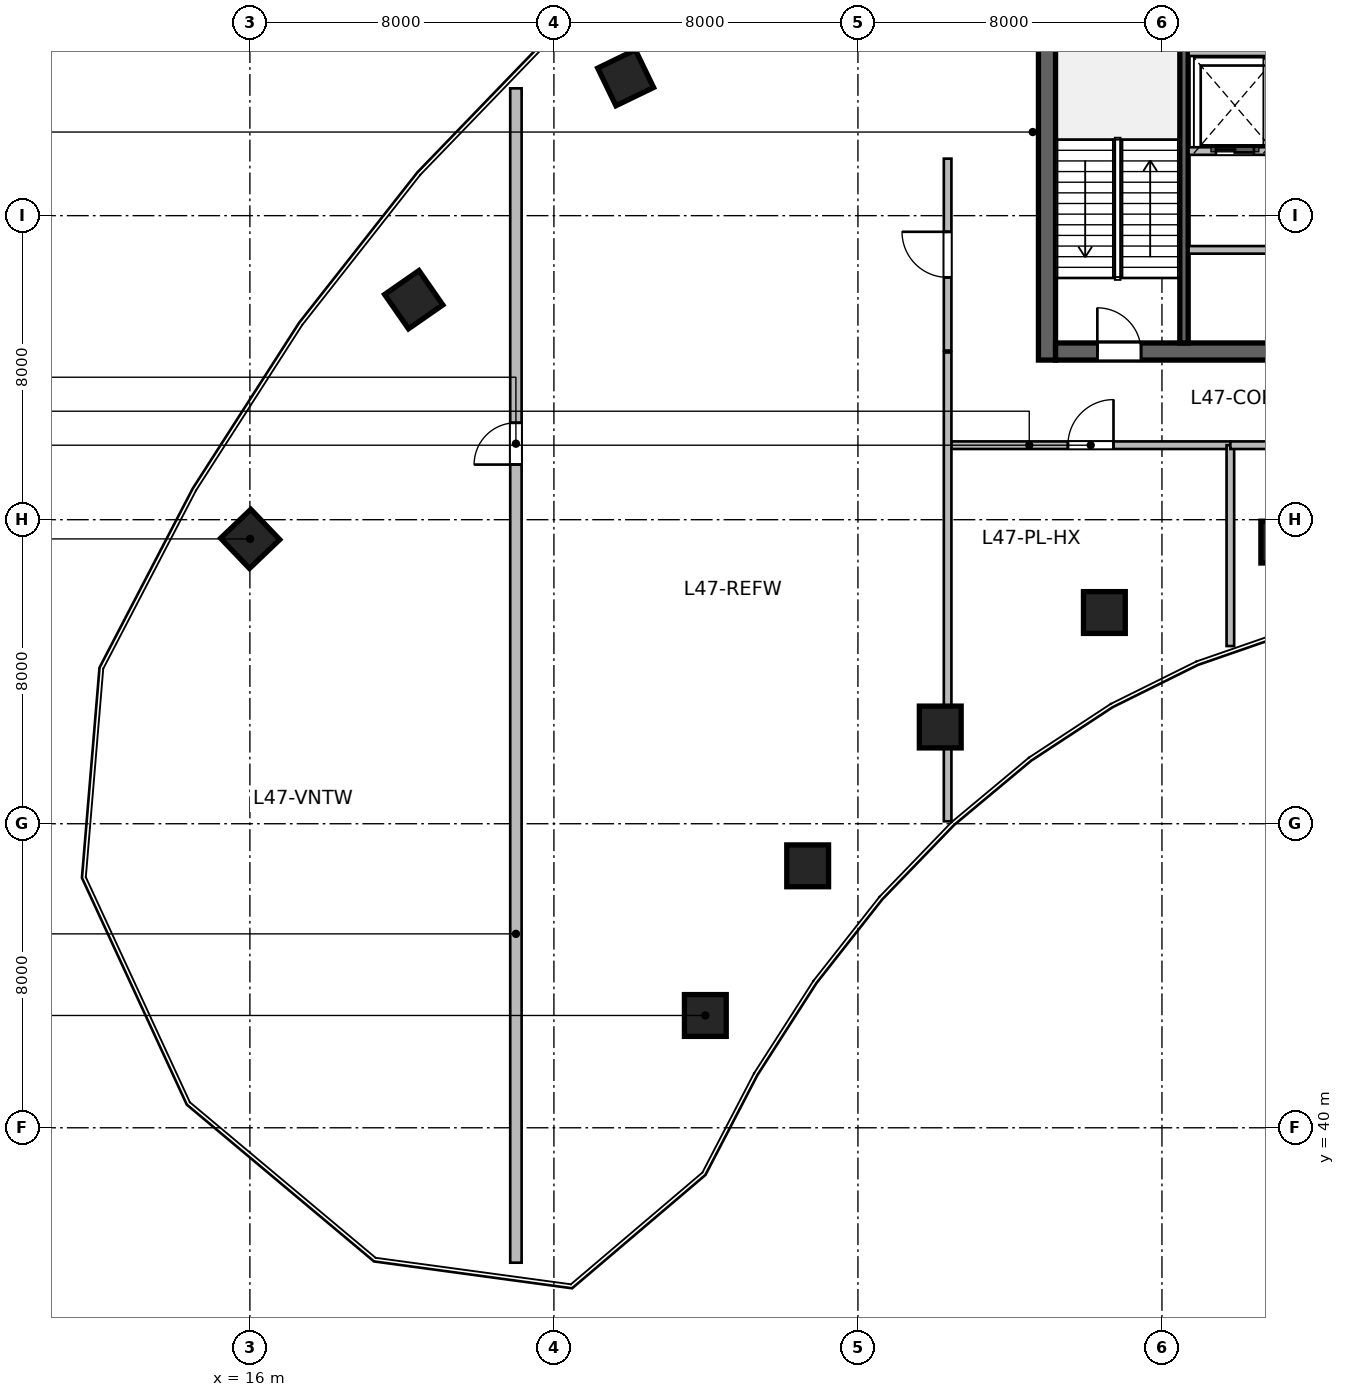
"""IFC4 building model, lengths in metres.
Left out: names, types, materials, properties, quantities, classifications, styles, units other than length and angle.
Written with IfcOpenShell. Run it as: python <this file> out.ifc"""

import sys

from ifc_helpers import new_model, si_unit, direction, frame, frame_2d, origin, origin_2d, place, context, subcontext, project, spatial, rectangle, circle, extrude, source, transform, mapped, element, fill, save


model = new_model("IFC4")
c1 = context("Model", 3, precision=1e-05, world=origin(), true_north=direction((0.0, 1.0)))
c2 = subcontext(c1, "Body", "Model", "MODEL_VIEW")
j1 = project(units=[si_unit("LENGTHUNIT", "METRE"), si_unit("PLANEANGLEUNIT", "RADIAN")], contexts=[c1])
p1 = place(None, origin())
s1 = spatial("IfcSite", under=j1, at=p1, CompositionType="ELEMENT")
p2 = place(p1, origin())
s2 = spatial("IfcBuilding", under=s1, at=p2, CompositionType="ELEMENT")
p3 = place(p2, frame((0.0, 0.0, 194.4)))
s3 = spatial("IfcBuildingStorey", under=s2, at=p3, CompositionType="ELEMENT", Elevation=194.4)
m1 = source(origin(), c2, "Body", "SweptSolid", [
    extrude(rectangle(XDim=12.0, YDim=0.45, at=frame_2d((6.0, 0.0))), origin(), (0.0, 0.0, 1.0), 4.8),
])
p4 = place(p3, frame((36.975, 60.2, 0.0), z_axis=(0.0, 0.0, 1.0), x_axis=(0.0, 1.0, 0.0)))
e1 = element("IfcWall", 1, at=p4, inside=s3, PredefinedType="SHEAR", context=c2, shape_type="MappedRepresentation", body=[
    mapped(m1, transform((0.0, 0.0, 0.0), scale=1.0)),
])
m2 = source(origin(), c2, "Body", "SweptSolid", [
    extrude(rectangle(XDim=21.6, YDim=0.45, at=frame_2d((10.8, 0.0))), origin(), (0.0, 0.0, 1.0), 4.8),
])
p5 = place(p3, frame((37.2, 60.425, 0.0), z_axis=(0.0, 0.0, 1.0), x_axis=(1.0, 0.0, 0.0)))
e2 = element("IfcWall", 2, at=p5, inside=s3, PredefinedType="SHEAR", context=c2, shape_type="MappedRepresentation", body=[
    mapped(m2, transform((0.0, 0.0, 0.0), scale=1.0)),
])
p6 = place(p5, frame((1.1, 0.0, 0.0)))
e3 = element("IfcOpeningElement", 3, at=p6, cuts=e2, PredefinedType="OPENING", context=c2, shape_type="SweptSolid", body=[
    extrude(rectangle(XDim=1.15, YDim=2.15, at=frame_2d((0.575, 1.075))), frame((0.0, 0.235, 0.0), z_axis=(0.0, -1.0, 0.0), x_axis=(1.0, 0.0, 0.0)), (0.0, 0.0, 1.0), 0.47),
])
p7 = place(p5, frame((19.5, 0.0, 0.0)))
e4 = element("IfcOpeningElement", 4, at=p7, cuts=e2, PredefinedType="OPENING", context=c2, shape_type="SweptSolid", body=[
    extrude(rectangle(XDim=0.9, YDim=2.1, at=frame_2d((0.45, 1.05))), frame((0.0, 0.235, 0.0), z_axis=(0.0, -1.0, 0.0), x_axis=(1.0, 0.0, 0.0)), (0.0, 0.0, 1.0), 0.47),
])
p8 = place(p5, frame((12.02, 0.0, 0.0)))
e5 = element("IfcOpeningElement", 5, at=p8, cuts=e2, PredefinedType="OPENING", context=c2, shape_type="SweptSolid", body=[
    extrude(rectangle(XDim=1.6, YDim=2.15, at=frame_2d((0.8, 1.075))), frame((0.0, 0.235, 0.0), z_axis=(0.0, -1.0, 0.0), x_axis=(1.0, 0.0, 0.0)), (0.0, 0.0, 1.0), 0.47),
])
m3 = source(origin(), c2, "Body", "SweptSolid", [
    extrude(rectangle(XDim=11.1, YDim=0.22, at=frame_2d((5.55, 0.0))), origin(), (0.0, 0.0, 1.0), 4.8),
])
p9 = place(p3, frame((40.58, 60.65, 0.0), z_axis=(0.0, 0.0, 1.0), x_axis=(0.0, 1.0, 0.0)))
e6 = element("IfcWall", 6, at=p9, inside=s3, PredefinedType="SHEAR", context=c2, shape_type="MappedRepresentation", body=[
    mapped(m3, transform((0.0, 0.0, 0.0), scale=1.0)),
])
m4 = source(origin(), c2, "Body", "SweptSolid", [
    extrude(circle(Radius=0.55, at=origin_2d()), origin(), (0.0, 0.0, 1.0), 4.8),
])
p10 = place(p3, frame((27.985, 42.955, 0.0), z_axis=(0.0, 0.0, 1.0), x_axis=(-0.690756218984, 0.723087716626, 0.0)))
e7 = element("IfcColumn", 7, at=p10, inside=s3, PredefinedType="COLUMN", context=c2, shape_type="MappedRepresentation", body=[
    mapped(m4, transform((0.0, 0.0, 0.0), scale=1.0)),
])
m5 = source(origin(), c2, "Body", "SweptSolid", [
    extrude(rectangle(XDim=1.1, YDim=1.1, at=origin_2d()), origin(), (0.0, 0.0, 1.0), 4.8),
])
p11 = place(p3, frame((16.007, 55.494, 0.0), z_axis=(0.0, 0.0, 1.0), x_axis=(-0.690756218984, 0.723087716626, 0.0)))
e8 = element("IfcColumn", 8, at=p11, inside=s3, PredefinedType="COLUMN", context=c2, shape_type="MappedRepresentation", body=[
    mapped(m5, transform((0.0, 0.0, 0.0), scale=1.0)),
])
p12 = place(p3, frame((30.677, 46.892, 0.0), z_axis=(0.0, 0.0, 1.0), x_axis=(-0.571143442153, 0.820850271661, 0.0)))
e9 = element("IfcColumn", 9, at=p12, inside=s3, PredefinedType="COLUMN", context=c2, shape_type="MappedRepresentation", body=[
    mapped(m4, transform((0.0, 0.0, 0.0), scale=1.0)),
])
p13 = place(p3, frame((20.311, 61.789, 0.0), z_axis=(0.0, 0.0, 1.0), x_axis=(-0.571143442153, 0.820850271661, 0.0)))
e10 = element("IfcColumn", 10, at=p13, inside=s3, PredefinedType="COLUMN", context=c2, shape_type="MappedRepresentation", body=[
    mapped(m5, transform((0.0, 0.0, 0.0), scale=1.0)),
])
p14 = place(p3, frame((34.166, 50.545, 0.0), z_axis=(0.0, 0.0, 1.0), x_axis=(-0.436173672171, 0.899862504889, 0.0)))
e11 = element("IfcColumn", 11, at=p14, inside=s3, PredefinedType="COLUMN", context=c2, shape_type="MappedRepresentation", body=[
    mapped(m4, transform((0.0, 0.0, 0.0), scale=1.0)),
])
p15 = place(p3, frame((25.888, 67.627, 0.0), z_axis=(0.0, 0.0, 1.0), x_axis=(-0.436173672171, 0.899862504889, 0.0)))
e12 = element("IfcColumn", 12, at=p15, inside=s3, PredefinedType="COLUMN", context=c2, shape_type="MappedRepresentation", body=[
    mapped(m5, transform((0.0, 0.0, 0.0), scale=1.0)),
])
for number, where, z_axis, x_axis in (
    (13, (38.485, 53.558, 0.0), (0.0, 0.0, 1.0), (-0.289, 0.957, 0.0)),
    (14, (43.154, 55.411, 0.0), (0.0, 0.0, 1.0), (-0.143, 0.99, 0.0)),
):
    element("IfcColumn", number, at=place(p3, frame(where, z_axis=z_axis, x_axis=x_axis)), inside=s3, PredefinedType="COLUMN", context=c2, shape_type="MappedRepresentation", body=[
        mapped(m4, transform((0.0, 0.0, 0.0), scale=1.0)),
    ])
m6 = source(origin(), c2, "Body", "SweptSolid", [
    extrude(rectangle(XDim=30.9, YDim=0.3, at=frame_2d((15.45, 0.0))), origin(), (0.0, 0.0, 1.0), 4.54),
])
p16 = place(p3, frame((23.0, 36.45, 0.0), z_axis=(0.0, 0.0, 1.0), x_axis=(0.0, 1.0, 0.0)))
e15 = element("IfcWall", 15, at=p16, inside=s3, PredefinedType="SOLIDWALL", context=c2, shape_type="MappedRepresentation", body=[
    mapped(m6, transform((0.0, 0.0, 0.0), scale=1.0)),
])
p17 = place(p16, frame((21.0, 0.0, 0.0)))
e16 = element("IfcOpeningElement", 16, at=p17, cuts=e15, PredefinedType="OPENING", context=c2, shape_type="SweptSolid", body=[
    extrude(rectangle(XDim=1.1, YDim=2.15, at=frame_2d((0.55, 1.075))), frame((0.0, 0.16, 0.0), z_axis=(0.0, -1.0, 0.0), x_axis=(1.0, 0.0, 0.0)), (0.0, 0.0, 1.0), 0.32),
])
m7 = source(origin(), c2, "Body", "SweptSolid", [
    extrude(rectangle(XDim=8.8, YDim=0.2, at=frame_2d((4.4, 0.0))), origin(), (0.0, 0.0, 1.0), 4.54),
])
p18 = place(p3, frame((40.7, 68.3, 0.0), z_axis=(0.0, 0.0, 1.0), x_axis=(1.0, 0.0, 0.0)))
e17 = element("IfcWall", 17, at=p18, inside=s3, PredefinedType="SOLIDWALL", context=c2, shape_type="MappedRepresentation", body=[
    mapped(m7, transform((0.0, 0.0, 0.0), scale=1.0)),
])
m8 = source(origin(), c2, "Body", "SweptSolid", [
    extrude(rectangle(XDim=8.02, YDim=0.2, at=frame_2d((4.01, 0.0))), origin(), (0.0, 0.0, 1.0), 4.54),
])
p19 = place(p3, frame((40.7, 63.1, 0.0), z_axis=(0.0, 0.0, 1.0), x_axis=(1.0, 0.0, 0.0)))
e18 = element("IfcWall", 18, at=p19, inside=s3, PredefinedType="SOLIDWALL", context=c2, shape_type="MappedRepresentation", body=[
    mapped(m8, transform((0.0, 0.0, 0.0), scale=1.0)),
])
p20 = place(p3, frame((40.7, 65.7, 0.0), z_axis=(0.0, 0.0, 1.0), x_axis=(1.0, 0.0, 0.0)))
e19 = element("IfcWall", 19, at=p20, inside=s3, PredefinedType="SOLIDWALL", context=c2, shape_type="MappedRepresentation", body=[
    mapped(m7, transform((0.0, 0.0, 0.0), scale=1.0)),
])
p21 = place(p20, frame((0.72, 0.0, 0.0)))
e20 = element("IfcOpeningElement", 20, at=p21, cuts=e19, PredefinedType="OPENING", context=c2, shape_type="SweptSolid", body=[
    extrude(rectangle(XDim=1.0, YDim=2.15, at=frame_2d((0.5, 1.075))), frame((0.0, 0.11, 0.0), z_axis=(0.0, -1.0, 0.0), x_axis=(1.0, 0.0, 0.0)), (0.0, 0.0, 1.0), 0.22),
])
p22 = place(p20, frame((2.62, 0.0, 0.0)))
e21 = element("IfcOpeningElement", 21, at=p22, cuts=e19, PredefinedType="OPENING", context=c2, shape_type="SweptSolid", body=[
    extrude(rectangle(XDim=1.0, YDim=2.15, at=frame_2d((0.5, 1.075))), frame((0.0, 0.11, 0.0), z_axis=(0.0, -1.0, 0.0), x_axis=(1.0, 0.0, 0.0)), (0.0, 0.0, 1.0), 0.22),
])
p23 = place(p20, frame((4.55, 0.0, 0.0)))
e22 = element("IfcOpeningElement", 22, at=p23, cuts=e19, PredefinedType="OPENING", context=c2, shape_type="SweptSolid", body=[
    extrude(rectangle(XDim=1.0, YDim=2.15, at=frame_2d((0.5, 1.075))), frame((0.0, 0.11, 0.0), z_axis=(0.0, -1.0, 0.0), x_axis=(1.0, 0.0, 0.0)), (0.0, 0.0, 1.0), 0.22),
])
p24 = place(p20, frame((6.55, 0.0, 0.0)))
e23 = element("IfcOpeningElement", 23, at=p24, cuts=e19, PredefinedType="OPENING", context=c2, shape_type="SweptSolid", body=[
    extrude(rectangle(XDim=1.0, YDim=2.15, at=frame_2d((0.5, 1.075))), frame((0.0, 0.11, 0.0), z_axis=(0.0, -1.0, 0.0), x_axis=(1.0, 0.0, 0.0)), (0.0, 0.0, 1.0), 0.22),
])
m9 = source(origin(), c2, "Body", "SweptSolid", [
    extrude(rectangle(XDim=7.35, YDim=0.2, at=frame_2d((3.675, 0.0))), origin(), (0.0, 0.0, 1.0), 3.985),
])
p25 = place(p3, frame((34.45, 57.96, 0.0), z_axis=(0.0, 0.0, 1.0), x_axis=(1.0, 0.0, 0.0)))
e24 = element("IfcWall", 24, at=p25, inside=s3, PredefinedType="SOLIDWALL", context=c2, shape_type="MappedRepresentation", body=[
    mapped(m9, transform((0.0, 0.0, 0.0), scale=1.0)),
])
p26 = place(p25, frame((3.075, 0.0, 0.0)))
e25 = element("IfcOpeningElement", 25, at=p26, cuts=e24, PredefinedType="OPENING", context=c2, shape_type="SweptSolid", body=[
    extrude(rectangle(XDim=1.2, YDim=2.15, at=frame_2d((0.6, 1.075))), frame((0.0, 0.11, 0.0), z_axis=(0.0, -1.0, 0.0), x_axis=(1.0, 0.0, 0.0)), (0.0, 0.0, 1.0), 0.22),
])
m10 = source(origin(), c2, "Body", "SweptSolid", [
    extrude(rectangle(XDim=5.285, YDim=0.2, at=frame_2d((2.643, 0.0))), origin(), (0.0, 0.0, 1.0), 4.54),
])
p27 = place(p3, frame((41.8, 52.675, 0.0), z_axis=(0.0, 0.0, 1.0), x_axis=(0.0, 1.0, 0.0)))
e26 = element("IfcWall", 26, at=p27, inside=s3, PredefinedType="SOLIDWALL", context=c2, shape_type="MappedRepresentation", body=[
    mapped(m10, transform((0.0, 0.0, 0.0), scale=1.0)),
])
m11 = source(origin(), c2, "Body", "SweptSolid", [
    extrude(rectangle(XDim=7.0, YDim=0.2, at=frame_2d((3.5, 0.0))), origin(), (0.0, 0.0, 1.0), 4.54),
])
p28 = place(p3, frame((41.8, 57.96, 0.0), z_axis=(0.0, 0.0, 1.0), x_axis=(1.0, 0.0, 0.0)))
e27 = element("IfcWall", 27, at=p28, inside=s3, PredefinedType="SOLIDWALL", context=c2, shape_type="MappedRepresentation", body=[
    mapped(m11, transform((0.0, 0.0, 0.0), scale=1.0)),
])
p29 = place(p28, frame((2.9, 0.0, 0.0)))
e28 = element("IfcOpeningElement", 28, at=p29, cuts=e27, PredefinedType="OPENING", context=c2, shape_type="SweptSolid", body=[
    extrude(rectangle(XDim=1.2, YDim=2.15, at=frame_2d((0.6, 1.075))), frame((0.0, 0.11, 0.0), z_axis=(0.0, -1.0, 0.0), x_axis=(1.0, 0.0, 0.0)), (0.0, 0.0, 1.0), 0.22),
])
m12 = source(origin(), c2, "Body", "SweptSolid", [
    extrude(rectangle(XDim=12.336, YDim=0.2, at=frame_2d((6.168, 0.0))), origin(), (0.0, 0.0, 1.0), 4.54),
])
p30 = place(p3, frame((34.36, 48.064, 0.0), z_axis=(0.0, 0.0, 1.0), x_axis=(0.0, 1.0, 0.0)))
e29 = element("IfcWall", 29, at=p30, inside=s3, PredefinedType="SOLIDWALL", context=c2, shape_type="MappedRepresentation", body=[
    mapped(m12, transform((0.0, 0.0, 0.0), scale=1.0)),
])
m13 = source(origin(), c2, "Body", "SweptSolid", [
    extrude(rectangle(XDim=5.05, YDim=0.2, at=frame_2d((2.525, 0.0))), origin(), (0.0, 0.0, 1.0), 4.54),
])
p31 = place(p3, frame((34.36, 60.45, 0.0), z_axis=(0.0, 0.0, 1.0), x_axis=(0.0, 1.0, 0.0)))
e30 = element("IfcWall", 30, at=p31, inside=s3, PredefinedType="SOLIDWALL", context=c2, shape_type="MappedRepresentation", body=[
    mapped(m13, transform((0.0, 0.0, 0.0), scale=1.0)),
])
p32 = place(p31, frame((1.925, 0.0, 0.0)))
e31 = element("IfcOpeningElement", 31, at=p32, cuts=e30, PredefinedType="OPENING", context=c2, shape_type="SweptSolid", body=[
    extrude(rectangle(XDim=1.2, YDim=2.15, at=frame_2d((0.6, 1.075))), frame((0.0, 0.11, 0.0), z_axis=(0.0, -1.0, 0.0), x_axis=(1.0, 0.0, 0.0)), (0.0, 0.0, 1.0), 0.22),
])
m14 = source(origin(), c2, "Body", "SweptSolid", [
    extrude(rectangle(XDim=1.1, YDim=2.15, at=frame_2d((0.55, 1.075))), frame((0.0, 0.025, 0.0), z_axis=(0.0, -1.0, 0.0), x_axis=(1.0, 0.0, 0.0)), (0.0, 0.0, 1.0), 0.05),
])
p33 = place(p17, origin())
e32 = element("IfcDoor", 32, at=p33, inside=s3, OperationType="SINGLE_SWING_LEFT", PredefinedType="DOOR", context=c2, shape_type="MappedRepresentation", body=[
    mapped(m14, transform((0.0, 0.0, 0.0), scale=1.0)),
])
fill(e16, e32)
m15 = source(origin(), c2, "Body", "SweptSolid", [
    extrude(rectangle(XDim=1.15, YDim=2.15, at=frame_2d((0.575, 1.075))), frame((0.0, 0.025, 0.0), z_axis=(0.0, -1.0, 0.0), x_axis=(1.0, 0.0, 0.0)), (0.0, 0.0, 1.0), 0.05),
])
p34 = place(p6, origin())
e33 = element("IfcDoor", 33, at=p34, inside=s3, OperationType="SINGLE_SWING_LEFT", PredefinedType="DOOR", context=c2, shape_type="MappedRepresentation", body=[
    mapped(m15, transform((0.0, 0.0, 0.0), scale=1.0)),
])
fill(e3, e33)
m16 = source(origin(), c2, "Body", "SweptSolid", [
    extrude(rectangle(XDim=1.0, YDim=2.15, at=frame_2d((0.5, 1.075))), frame((0.0, 0.025, 0.0), z_axis=(0.0, -1.0, 0.0), x_axis=(1.0, 0.0, 0.0)), (0.0, 0.0, 1.0), 0.05),
])
p35 = place(p21, origin())
e34 = element("IfcDoor", 34, at=p35, inside=s3, OperationType="DOUBLE_DOOR_SLIDING", PredefinedType="DOOR", context=c2, shape_type="MappedRepresentation", body=[
    mapped(m16, transform((0.0, 0.0, 0.0), scale=1.0)),
])
fill(e20, e34)
m17 = source(origin(), c2, "Body", "SweptSolid", [
    extrude(rectangle(XDim=1.2, YDim=2.15, at=frame_2d((0.6, 1.075))), frame((0.0, 0.025, 0.0), z_axis=(0.0, -1.0, 0.0), x_axis=(1.0, 0.0, 0.0)), (0.0, 0.0, 1.0), 0.05),
])
p36 = place(p26, origin())
e35 = element("IfcDoor", 35, at=p36, inside=s3, OperationType="SINGLE_SWING_RIGHT", PredefinedType="DOOR", context=c2, shape_type="MappedRepresentation", body=[
    mapped(m17, transform((0.0, 0.0, 0.0), scale=1.0)),
])
fill(e25, e35)
p37 = place(p32, origin())
e36 = element("IfcDoor", 36, at=p37, inside=s3, OperationType="SINGLE_SWING_RIGHT", PredefinedType="DOOR", context=c2, shape_type="MappedRepresentation", body=[
    mapped(m17, transform((0.0, 0.0, 0.0), scale=1.0)),
])
fill(e31, e36)
save(model, sys.argv[1])
